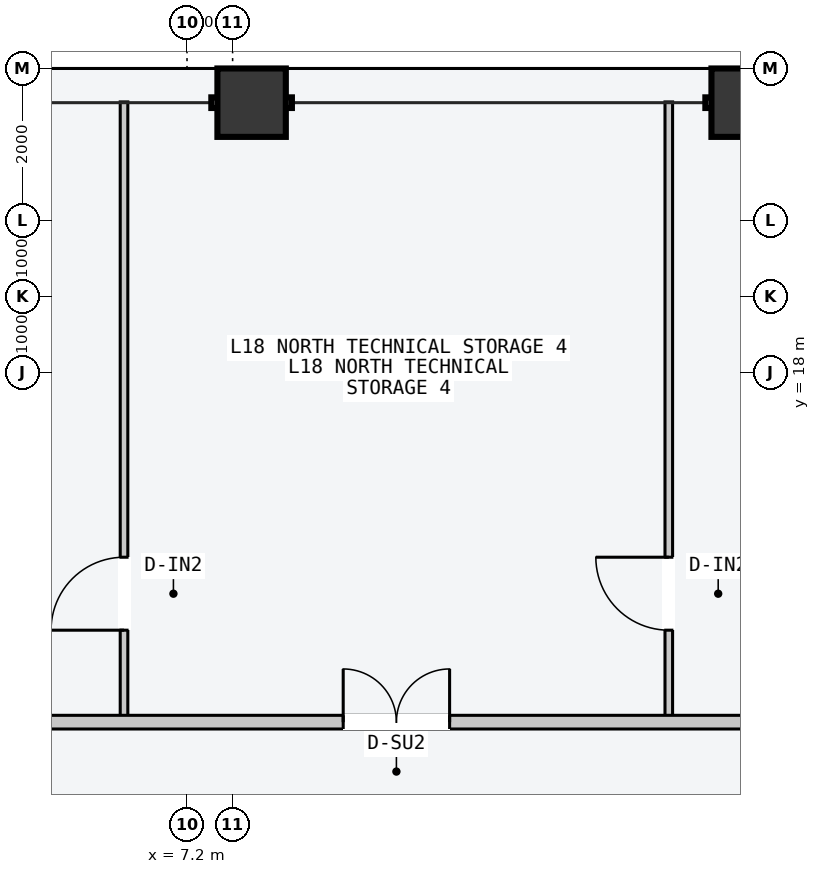
"""IFC4 building model, lengths in metres.
Left out: names, types, materials, properties, quantities, classifications, styles, units other than length and angle.
Written with IfcOpenShell. Run it as: python <this file> out.ifc"""

import sys

from ifc_helpers import new_model, si_unit, direction, frame, frame_2d, origin, origin_2d, place, context, subcontext, project, spatial, rectangle, hollow_rectangle, extrude, element, fill, save


model = new_model("IFC4")
c1 = context("Model", 3, precision=1e-05, world=origin(), true_north=direction((0.0, 1.0)))
c2 = subcontext(c1, "Body", "Model", "MODEL_VIEW")
j1 = project(units=[si_unit("LENGTHUNIT", "METRE"), si_unit("PLANEANGLEUNIT", "RADIAN")], contexts=[c1])
p1 = place(None, origin())
s1 = spatial("IfcSite", under=j1, at=p1, CompositionType="ELEMENT")
p2 = place(p1, origin())
s2 = spatial("IfcBuilding", under=s1, at=p2, CompositionType="ELEMENT")
p3 = place(p2, frame((0.0, 0.0, 70.8)))
s3 = spatial("IfcBuildingStorey", under=s2, at=p3, CompositionType="ELEMENT", Elevation=70.8)
for number, where, z_axis, x_axis in (
    (1, (8.05, 21.55, 0.0), (0.0, 0.0, 1.0), (1.0, 0.0, 0.0)),
    (2, (14.55, 21.55, 0.0), (0.0, 0.0, 1.0), (1.0, 0.0, 0.0)),
):
    element("IfcColumn", number, at=place(p3, frame(where, z_axis=z_axis, x_axis=x_axis)), inside=s3, PredefinedType="COLUMN", context=c2, shape_type="SweptSolid", body=[
        extrude(hollow_rectangle(XDim=0.9, YDim=0.9, WallThickness=0.045, at=origin_2d()), origin(), (0.0, 0.0, 1.0), 3.6),
    ])
p4 = place(p3, frame((6.371, 13.46, 0.0), z_axis=(0.0, 0.0, 1.0), x_axis=(0.0, 1.0, 0.0)))
e3 = element("IfcWall", 3, at=p4, inside=s3, PredefinedType="PARTITIONING", context=c2, shape_type="SweptSolid", body=[
    extrude(rectangle(XDim=8.1, YDim=0.1, at=frame_2d((4.05, 0.0))), origin(), (0.0, 0.0, 1.0), 3.4),
])
p5 = place(p4, frame((1.15, 0.0, 0.0)))
e4 = element("IfcOpeningElement", 4, at=p5, cuts=e3, PredefinedType="OPENING", context=c2, shape_type="SweptSolid", body=[
    extrude(rectangle(XDim=0.96, YDim=2.18, at=frame_2d((0.48, 1.09))), frame((0.0, 0.06, 0.0), z_axis=(0.0, -1.0, 0.0), x_axis=(1.0, 0.0, 0.0)), (0.0, 0.0, 1.0), 0.12),
])
p6 = place(p3, frame((13.539, 13.46, 0.0), z_axis=(0.0, 0.0, 1.0), x_axis=(0.0, 1.0, 0.0)))
e5 = element("IfcWall", 5, at=p6, inside=s3, PredefinedType="PARTITIONING", context=c2, shape_type="SweptSolid", body=[
    extrude(rectangle(XDim=8.1, YDim=0.1, at=frame_2d((4.05, 0.0))), origin(), (0.0, 0.0, 1.0), 3.4),
])
p7 = place(p6, frame((1.15, 0.0, 0.0)))
e6 = element("IfcOpeningElement", 6, at=p7, cuts=e5, PredefinedType="OPENING", context=c2, shape_type="SweptSolid", body=[
    extrude(rectangle(XDim=0.96, YDim=2.18, at=frame_2d((0.48, 1.09))), frame((0.0, 0.06, 0.0), z_axis=(0.0, -1.0, 0.0), x_axis=(1.0, 0.0, 0.0)), (0.0, 0.0, 1.0), 0.12),
])
p8 = place(p3, frame((-19.2, 13.4, 0.0), z_axis=(0.0, 0.0, 1.0), x_axis=(1.0, 0.0, 0.0)))
e7 = element("IfcWall", 7, at=p8, inside=s3, PredefinedType="PARTITIONING", context=c2, shape_type="SweptSolid", body=[
    extrude(rectangle(XDim=38.4, YDim=0.18, at=frame_2d((19.2, 0.0))), origin(), (0.0, 0.0, 1.0), 3.4),
])
p9 = place(p8, frame((4.113, 0.0, 0.0)))
e8 = element("IfcOpeningElement", 8, at=p9, cuts=e7, PredefinedType="OPENING", context=c2, shape_type="SweptSolid", body=[
    extrude(rectangle(XDim=1.02, YDim=2.2, at=frame_2d((0.51, 1.1))), frame((0.0, 0.1, 0.0), z_axis=(0.0, -1.0, 0.0), x_axis=(1.0, 0.0, 0.0)), (0.0, 0.0, 1.0), 0.2),
])
p10 = place(p8, frame((13.095, 0.0, 0.0)))
e9 = element("IfcOpeningElement", 9, at=p10, cuts=e7, PredefinedType="OPENING", context=c2, shape_type="SweptSolid", body=[
    extrude(rectangle(XDim=1.06, YDim=2.2, at=frame_2d((0.53, 1.1))), frame((0.0, 0.1, 0.0), z_axis=(0.0, -1.0, 0.0), x_axis=(1.0, 0.0, 0.0)), (0.0, 0.0, 1.0), 0.2),
])
p11 = place(p8, frame((21.168, 0.0, 0.0)))
e10 = element("IfcOpeningElement", 10, at=p11, cuts=e7, PredefinedType="OPENING", context=c2, shape_type="SweptSolid", body=[
    extrude(rectangle(XDim=1.24, YDim=2.24, at=frame_2d((0.62, 1.12))), frame((0.0, 0.1, 0.0), z_axis=(0.0, -1.0, 0.0), x_axis=(1.0, 0.0, 0.0)), (0.0, 0.0, 1.0), 0.2),
])
p12 = place(p8, frame((28.455, 0.0, 0.0)))
e11 = element("IfcOpeningElement", 11, at=p12, cuts=e7, PredefinedType="OPENING", context=c2, shape_type="SweptSolid", body=[
    extrude(rectangle(XDim=1.4, YDim=2.2, at=frame_2d((0.7, 1.1))), frame((0.0, 0.1, 0.0), z_axis=(0.0, -1.0, 0.0), x_axis=(1.0, 0.0, 0.0)), (0.0, 0.0, 1.0), 0.2),
])
p13 = place(p8, frame((35.119, 0.0, 0.0)))
e12 = element("IfcOpeningElement", 12, at=p13, cuts=e7, PredefinedType="OPENING", context=c2, shape_type="SweptSolid", body=[
    extrude(rectangle(XDim=0.9, YDim=2.15, at=frame_2d((0.45, 1.075))), frame((0.0, 0.1, 0.0), z_axis=(0.0, -1.0, 0.0), x_axis=(1.0, 0.0, 0.0)), (0.0, 0.0, 1.0), 0.2),
])
p14 = place(p5, origin())
e13 = element("IfcDoor", 13, at=p14, inside=s3, OperationType="SINGLE_SWING_LEFT", PredefinedType="DOOR", context=c2, shape_type="SweptSolid", body=[
    extrude(rectangle(XDim=0.96, YDim=2.18, at=frame_2d((0.48, 1.09))), frame((0.0, 0.025, 0.0), z_axis=(0.0, -1.0, 0.0), x_axis=(1.0, 0.0, 0.0)), (0.0, 0.0, 1.0), 0.05),
])
fill(e4, e13)
p15 = place(p7, origin())
e14 = element("IfcDoor", 14, at=p15, inside=s3, OperationType="SINGLE_SWING_RIGHT", PredefinedType="DOOR", context=c2, shape_type="SweptSolid", body=[
    extrude(rectangle(XDim=0.96, YDim=2.18, at=frame_2d((0.48, 1.09))), frame((0.0, 0.025, 0.0), z_axis=(0.0, -1.0, 0.0), x_axis=(1.0, 0.0, 0.0)), (0.0, 0.0, 1.0), 0.05),
])
fill(e6, e14)
p16 = place(p12, origin())
e15 = element("IfcDoor", 15, at=p16, inside=s3, OperationType="DOUBLE_DOOR_SINGLE_SWING", PredefinedType="DOOR", context=c2, shape_type="SweptSolid", body=[
    extrude(rectangle(XDim=1.4, YDim=2.2, at=frame_2d((0.7, 1.1))), frame((0.0, 0.025, 0.0), z_axis=(0.0, -1.0, 0.0), x_axis=(1.0, 0.0, 0.0)), (0.0, 0.0, 1.0), 0.05),
])
fill(e11, e15)
save(model, sys.argv[1])
